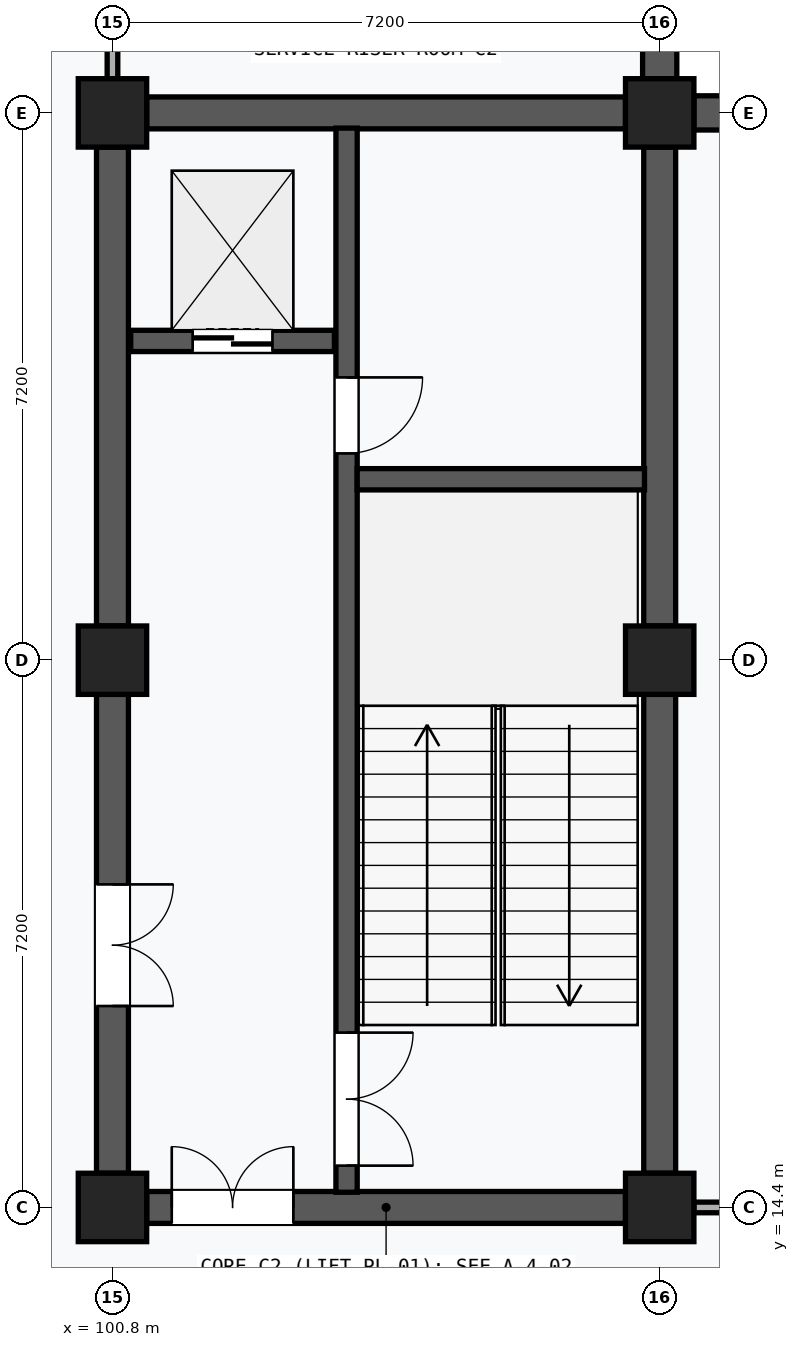
"""IFC4 building model, lengths in metres.
Left out: names, types, materials, properties, quantities, classifications, styles, units other than length and angle.
Written with IfcOpenShell. Run it as: python <this file> out.ifc"""

import sys

from ifc_helpers import new_model, si_unit, direction, frame, frame_2d, origin, origin_2d, place, context, subcontext, project, spatial, rectangle, extrude, element, fill, save


model = new_model("IFC4")
c1 = context("Model", 3, precision=1e-05, world=origin(), true_north=direction((0.0, 1.0)))
c2 = subcontext(c1, "Body", "Model", "MODEL_VIEW")
j1 = project(units=[si_unit("LENGTHUNIT", "METRE"), si_unit("PLANEANGLEUNIT", "RADIAN")], contexts=[c1])
p1 = place(None, origin())
s1 = spatial("IfcSite", under=j1, at=p1, CompositionType="ELEMENT")
p2 = place(p1, origin())
s2 = spatial("IfcBuilding", under=s1, at=p2, CompositionType="ELEMENT")
p3 = place(p2, frame((0.0, 0.0, -4.5)))
s3 = spatial("IfcBuildingStorey", under=s2, at=p3, CompositionType="ELEMENT", Elevation=-4.5)
for number, where, z_axis, x_axis in (
    (1, (100.8, 14.4, 0.0), (0.0, 0.0, 1.0), (1.0, 0.0, 0.0)),
    (2, (100.8, 21.6, 0.0), (0.0, 0.0, 1.0), (1.0, 0.0, 0.0)),
    (3, (100.8, 28.8, 0.0), (0.0, 0.0, 1.0), (1.0, 0.0, 0.0)),
    (4, (108.0, 14.4, 0.0), (0.0, 0.0, 1.0), (1.0, 0.0, 0.0)),
    (5, (108.0, 21.6, 0.0), (0.0, 0.0, 1.0), (1.0, 0.0, 0.0)),
    (6, (108.0, 28.8, 0.0), (0.0, 0.0, 1.0), (1.0, 0.0, 0.0)),
):
    element("IfcColumn", number, at=place(p3, frame(where, z_axis=z_axis, x_axis=x_axis)), inside=s3, PredefinedType="COLUMN", context=c2, shape_type="SweptSolid", body=[
        extrude(rectangle(XDim=0.9, YDim=0.9, at=origin_2d()), origin(), (0.0, 0.0, 1.0), 4.5),
    ])
p4 = place(p3, frame((108.0, 29.25, 0.0), z_axis=(0.0, 0.0, 1.0), x_axis=(0.0, 1.0, 0.0)))
e7 = element("IfcWall", 7, at=p4, inside=s3, PredefinedType="SOLIDWALL", context=c2, shape_type="SweptSolid", body=[
    extrude(rectangle(XDim=6.3, YDim=0.45, at=frame_2d((3.15, 0.0))), origin(), (0.0, 0.0, 1.0), 3.57),
])
p5 = place(p3, frame((108.45, 28.8, 0.0), z_axis=(0.0, 0.0, 1.0), x_axis=(1.0, 0.0, 0.0)))
e8 = element("IfcWall", 8, at=p5, inside=s3, PredefinedType="SOLIDWALL", context=c2, shape_type="SweptSolid", body=[
    extrude(rectangle(XDim=6.35, YDim=0.45, at=frame_2d((3.175, 0.0))), origin(), (0.0, 0.0, 1.0), 3.57),
])
p6 = place(p3, frame((100.8, 14.85, 0.0), z_axis=(0.0, 0.0, 1.0), x_axis=(0.0, 1.0, 0.0)))
e9 = element("IfcWall", 9, at=p6, inside=s3, PredefinedType="SHEAR", context=c2, shape_type="SweptSolid", body=[
    extrude(rectangle(XDim=6.3, YDim=0.42, at=frame_2d((3.15, 0.0))), origin(), (0.0, 0.0, 1.0), 3.3),
])
p7 = place(p6, frame((2.2, 0.0, 0.0)))
e10 = element("IfcOpeningElement", 10, at=p7, cuts=e9, PredefinedType="OPENING", context=c2, shape_type="SweptSolid", body=[
    extrude(rectangle(XDim=1.6, YDim=2.2, at=frame_2d((0.8, 1.1))), frame((0.0, 0.222, 0.0), z_axis=(0.0, -1.0, 0.0), x_axis=(1.0, 0.0, 0.0)), (0.0, 0.0, 1.0), 0.444),
])
p8 = place(p3, frame((100.8, 22.05, 0.0), z_axis=(0.0, 0.0, 1.0), x_axis=(0.0, 1.0, 0.0)))
e11 = element("IfcWall", 11, at=p8, inside=s3, PredefinedType="SHEAR", context=c2, shape_type="SweptSolid", body=[
    extrude(rectangle(XDim=6.3, YDim=0.42, at=frame_2d((3.15, 0.0))), origin(), (0.0, 0.0, 1.0), 3.3),
])
p9 = place(p3, frame((108.0, 14.85, 0.0), z_axis=(0.0, 0.0, 1.0), x_axis=(0.0, 1.0, 0.0)))
e12 = element("IfcWall", 12, at=p9, inside=s3, PredefinedType="SHEAR", context=c2, shape_type="SweptSolid", body=[
    extrude(rectangle(XDim=6.3, YDim=0.42, at=frame_2d((3.15, 0.0))), origin(), (0.0, 0.0, 1.0), 3.3),
])
p10 = place(p3, frame((108.0, 22.05, 0.0), z_axis=(0.0, 0.0, 1.0), x_axis=(0.0, 1.0, 0.0)))
e13 = element("IfcWall", 13, at=p10, inside=s3, PredefinedType="SHEAR", context=c2, shape_type="SweptSolid", body=[
    extrude(rectangle(XDim=6.3, YDim=0.42, at=frame_2d((3.15, 0.0))), origin(), (0.0, 0.0, 1.0), 3.3),
])
p11 = place(p3, frame((101.25, 14.4, 0.0), z_axis=(0.0, 0.0, 1.0), x_axis=(1.0, 0.0, 0.0)))
e14 = element("IfcWall", 14, at=p11, inside=s3, PredefinedType="SHEAR", context=c2, shape_type="SweptSolid", body=[
    extrude(rectangle(XDim=6.3, YDim=0.42, at=frame_2d((3.15, 0.0))), origin(), (0.0, 0.0, 1.0), 3.3),
])
p12 = place(p11, frame((0.33, 0.0, 0.0)))
e15 = element("IfcOpeningElement", 15, at=p12, cuts=e14, PredefinedType="OPENING", context=c2, shape_type="SweptSolid", body=[
    extrude(rectangle(XDim=1.6, YDim=2.2, at=frame_2d((0.8, 1.1))), frame((0.0, 0.222, 0.0), z_axis=(0.0, -1.0, 0.0), x_axis=(1.0, 0.0, 0.0)), (0.0, 0.0, 1.0), 0.444),
])
p13 = place(p3, frame((101.25, 28.8, 0.0), z_axis=(0.0, 0.0, 1.0), x_axis=(1.0, 0.0, 0.0)))
e16 = element("IfcWall", 16, at=p13, inside=s3, PredefinedType="SHEAR", context=c2, shape_type="SweptSolid", body=[
    extrude(rectangle(XDim=6.3, YDim=0.42, at=frame_2d((3.15, 0.0))), origin(), (0.0, 0.0, 1.0), 3.3),
])
p14 = place(p3, frame((103.88, 14.6, 0.0), z_axis=(0.0, 0.0, 1.0), x_axis=(0.0, 1.0, 0.0)))
e17 = element("IfcWall", 17, at=p14, inside=s3, PredefinedType="SHEAR", context=c2, shape_type="SweptSolid", body=[
    extrude(rectangle(XDim=14.0, YDim=0.28, at=frame_2d((7.0, 0.0))), origin(), (0.0, 0.0, 1.0), 4.2),
])
p15 = place(p14, frame((0.35, 0.0, 0.0)))
e18 = element("IfcOpeningElement", 18, at=p15, cuts=e17, PredefinedType="OPENING", context=c2, shape_type="SweptSolid", body=[
    extrude(rectangle(XDim=1.75, YDim=2.15, at=frame_2d((0.875, 1.075))), frame((0.0, 0.152, 0.0), z_axis=(0.0, -1.0, 0.0), x_axis=(1.0, 0.0, 0.0)), (0.0, 0.0, 1.0), 0.304),
])
p16 = place(p14, frame((9.72, 0.0, 0.0)))
e19 = element("IfcOpeningElement", 19, at=p16, cuts=e17, PredefinedType="OPENING", context=c2, shape_type="SweptSolid", body=[
    extrude(rectangle(XDim=1.0, YDim=2.15, at=frame_2d((0.5, 1.075))), frame((0.0, 0.152, 0.0), z_axis=(0.0, -1.0, 0.0), x_axis=(1.0, 0.0, 0.0)), (0.0, 0.0, 1.0), 0.304),
])
p17 = place(p3, frame((104.02, 23.98, 0.0), z_axis=(0.0, 0.0, 1.0), x_axis=(1.0, 0.0, 0.0)))
e20 = element("IfcWall", 20, at=p17, inside=s3, PredefinedType="SHEAR", context=c2, shape_type="SweptSolid", body=[
    extrude(rectangle(XDim=3.78, YDim=0.28, at=frame_2d((1.89, 0.0))), origin(), (0.0, 0.0, 1.0), 4.2),
])
p18 = place(p3, frame((101.04, 25.8, 0.0), z_axis=(0.0, 0.0, 1.0), x_axis=(1.0, 0.0, 0.0)))
e21 = element("IfcWall", 21, at=p18, inside=s3, PredefinedType="SHEAR", context=c2, shape_type="SweptSolid", body=[
    extrude(rectangle(XDim=2.68, YDim=0.28, at=frame_2d((1.34, 0.0))), origin(), (0.0, 0.0, 1.0), 4.2),
])
p19 = place(p18, frame((0.815, 0.0, 0.0)))
e22 = element("IfcOpeningElement", 22, at=p19, cuts=e21, PredefinedType="OPENING", context=c2, shape_type="SweptSolid", body=[
    extrude(rectangle(XDim=1.05, YDim=2.2, at=frame_2d((0.525, 1.1))), frame((0.0, 0.152, 0.0), z_axis=(0.0, -1.0, 0.0), x_axis=(1.0, 0.0, 0.0)), (0.0, 0.0, 1.0), 0.304),
])
p20 = place(p3, frame((108.45, 14.4, 0.0), z_axis=(0.0, 0.0, 1.0), x_axis=(1.0, 0.0, 0.0)))
e23 = element("IfcWall", 23, at=p20, inside=s3, PredefinedType="PARTITIONING", context=c2, shape_type="SweptSolid", body=[
    extrude(rectangle(XDim=6.35, YDim=0.14, at=frame_2d((3.175, 0.0))), origin(), (0.0, 0.0, 1.0), 3.3),
])
p21 = place(p20, frame((2.675, 0.0, 0.0)))
e24 = element("IfcOpeningElement", 24, at=p21, cuts=e23, PredefinedType="OPENING", context=c2, shape_type="SweptSolid", body=[
    extrude(rectangle(XDim=1.0, YDim=2.1, at=frame_2d((0.5, 1.05))), frame((0.0, 0.082, 0.0), z_axis=(0.0, -1.0, 0.0), x_axis=(1.0, 0.0, 0.0)), (0.0, 0.0, 1.0), 0.164),
])
p22 = place(p3, frame((100.8, 29.25, 0.0), z_axis=(0.0, 0.0, 1.0), x_axis=(0.0, 1.0, 0.0)))
e25 = element("IfcWall", 25, at=p22, inside=s3, PredefinedType="PARTITIONING", context=c2, shape_type="SweptSolid", body=[
    extrude(rectangle(XDim=6.3, YDim=0.14, at=frame_2d((3.15, 0.0))), origin(), (0.0, 0.0, 1.0), 3.3),
])
p23 = place(p22, frame((2.55, 0.0, 0.0)))
e26 = element("IfcOpeningElement", 26, at=p23, cuts=e25, PredefinedType="OPENING", context=c2, shape_type="SweptSolid", body=[
    extrude(rectangle(XDim=1.2, YDim=2.24, at=frame_2d((0.6, 1.12))), frame((0.0, 0.082, 0.0), z_axis=(0.0, -1.0, 0.0), x_axis=(1.0, 0.0, 0.0)), (0.0, 0.0, 1.0), 0.164),
])
p24 = place(p7, frame((1.6, 0.0, 0.0), z_axis=(0.0, 0.0, 1.0), x_axis=(-1.0, 0.0, 0.0)))
e27 = element("IfcDoor", 27, at=p24, inside=s3, OperationType="DOUBLE_DOOR_SINGLE_SWING", PredefinedType="DOOR", context=c2, shape_type="SweptSolid", body=[
    extrude(rectangle(XDim=1.6, YDim=2.2, at=frame_2d((0.8, 1.1))), frame((0.0, 0.025, 0.0), z_axis=(0.0, -1.0, 0.0), x_axis=(1.0, 0.0, 0.0)), (0.0, 0.0, 1.0), 0.05),
])
fill(e10, e27)
p25 = place(p12, origin())
e28 = element("IfcDoor", 28, at=p25, inside=s3, OperationType="DOUBLE_DOOR_SINGLE_SWING", PredefinedType="DOOR", context=c2, shape_type="SweptSolid", body=[
    extrude(rectangle(XDim=1.6, YDim=2.2, at=frame_2d((0.8, 1.1))), frame((0.0, 0.025, 0.0), z_axis=(0.0, -1.0, 0.0), x_axis=(1.0, 0.0, 0.0)), (0.0, 0.0, 1.0), 0.05),
])
fill(e15, e28)
p26 = place(p15, frame((1.75, 0.0, 0.0), z_axis=(0.0, 0.0, 1.0), x_axis=(-1.0, 0.0, 0.0)))
e29 = element("IfcDoor", 29, at=p26, inside=s3, OperationType="DOUBLE_DOOR_SINGLE_SWING", PredefinedType="DOOR", context=c2, shape_type="SweptSolid", body=[
    extrude(rectangle(XDim=1.75, YDim=2.15, at=frame_2d((0.875, 1.075))), frame((0.0, 0.025, 0.0), z_axis=(0.0, -1.0, 0.0), x_axis=(1.0, 0.0, 0.0)), (0.0, 0.0, 1.0), 0.05),
])
fill(e18, e29)
p27 = place(p16, frame((1.0, 0.0, 0.0), z_axis=(0.0, 0.0, 1.0), x_axis=(-1.0, 0.0, 0.0)))
e30 = element("IfcDoor", 30, at=p27, inside=s3, OperationType="SINGLE_SWING_LEFT", PredefinedType="DOOR", context=c2, shape_type="SweptSolid", body=[
    extrude(rectangle(XDim=1.0, YDim=2.15, at=frame_2d((0.5, 1.075))), frame((0.0, 0.025, 0.0), z_axis=(0.0, -1.0, 0.0), x_axis=(1.0, 0.0, 0.0)), (0.0, 0.0, 1.0), 0.05),
])
fill(e19, e30)
p28 = place(p19, frame((1.05, 0.0, 0.0), z_axis=(0.0, 0.0, 1.0), x_axis=(-1.0, 0.0, 0.0)))
e31 = element("IfcDoor", 31, at=p28, inside=s3, OperationType="DOUBLE_DOOR_SLIDING", PredefinedType="DOOR", context=c2, shape_type="SweptSolid", body=[
    extrude(rectangle(XDim=1.05, YDim=2.2, at=frame_2d((0.525, 1.1))), frame((0.0, 0.025, 0.0), z_axis=(0.0, -1.0, 0.0), x_axis=(1.0, 0.0, 0.0)), (0.0, 0.0, 1.0), 0.05),
])
fill(e22, e31)
save(model, sys.argv[1])
